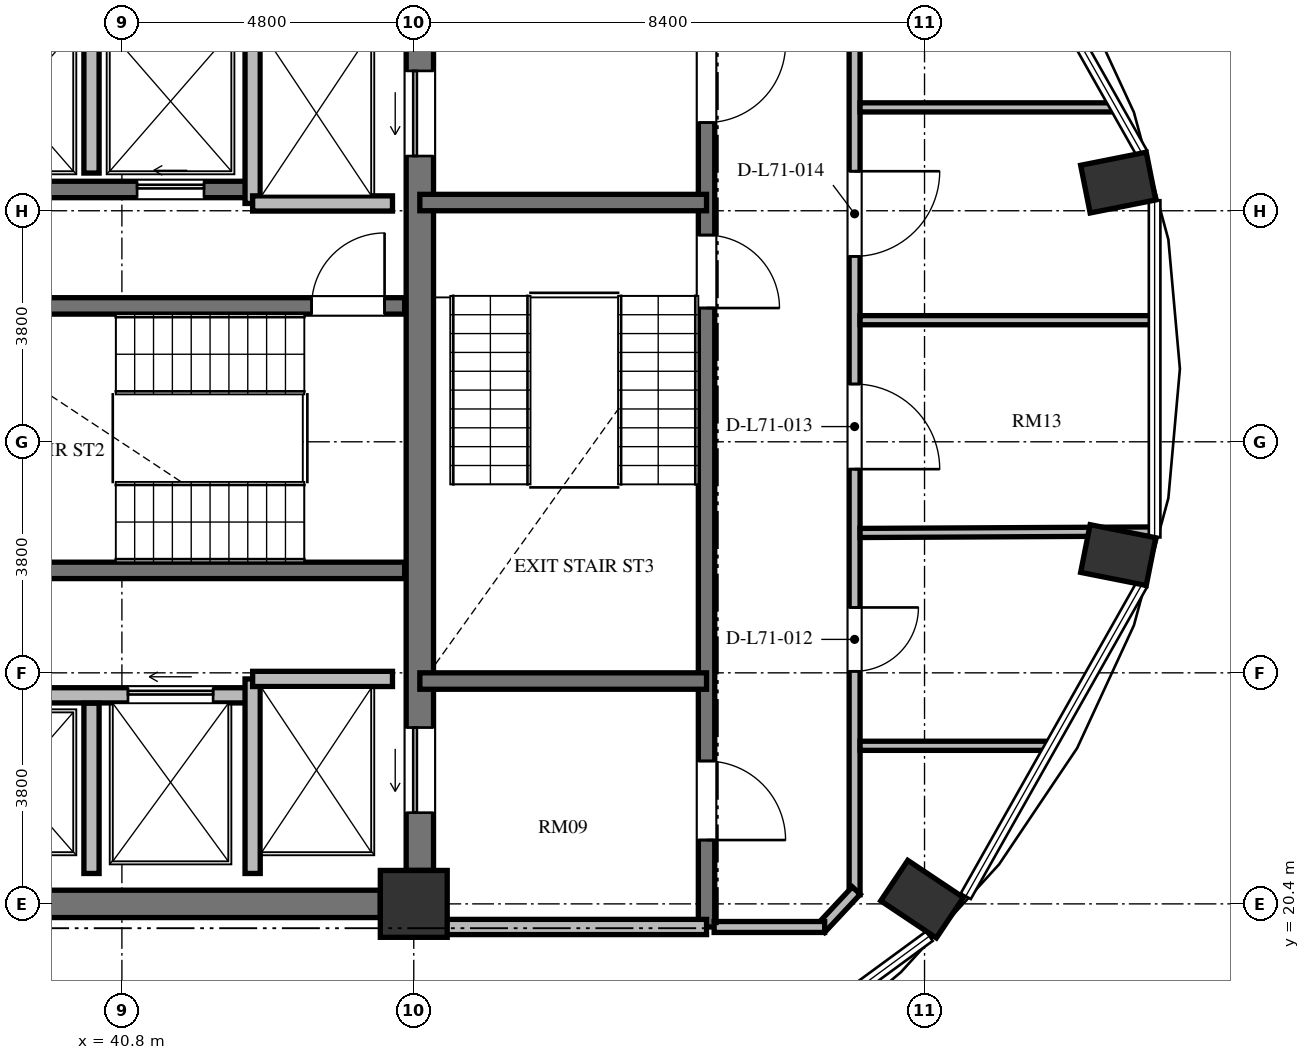
"""IFC4 building model, lengths in metres.
Left out: names, types, materials, properties, quantities, classifications, styles, units other than length and angle.
Written with IfcOpenShell. Run it as: python <this file> out.ifc"""

import sys

from ifc_helpers import new_model, si_unit, direction, frame, frame_2d, origin, origin_2d, place, context, subcontext, project, spatial, rectangle, extrude, element, fill, save


model = new_model("IFC4")
c1 = context("Model", 3, precision=1e-05, world=origin(), true_north=direction((0.0, 1.0)))
c2 = subcontext(c1, "Body", "Model", "MODEL_VIEW")
j1 = project(units=[si_unit("LENGTHUNIT", "METRE"), si_unit("PLANEANGLEUNIT", "RADIAN")], contexts=[c1])
p1 = place(None, origin())
s1 = spatial("IfcSite", under=j1, at=p1, CompositionType="ELEMENT")
p2 = place(p1, origin())
s2 = spatial("IfcBuilding", under=s1, at=p2, CompositionType="ELEMENT")
p3 = place(p2, frame((0.0, 0.0, 273.264)))
s3 = spatial("IfcBuildingStorey", under=s2, at=p3, CompositionType="ELEMENT", Elevation=273.264)
for number, where, z_axis, x_axis in (
    (1, (53.96, 20.478, 0.0), (0.0, 0.0, 1.0), (0.831, -0.556, 0.0)),
    (2, (57.185, 26.137, 0.0), (0.0, 0.0, 1.0), (0.981, -0.195, 0.0)),
    (3, (57.185, 32.263, 0.0), (0.0, 0.0, 1.0), (0.981, 0.195, 0.0)),
):
    element("IfcColumn", number, at=place(p3, frame(where, z_axis=z_axis, x_axis=x_axis)), inside=s3, PredefinedType="COLUMN", context=c2, shape_type="SweptSolid", body=[
        extrude(rectangle(XDim=1.1, YDim=0.8, at=origin_2d()), origin(), (0.0, 0.0, 1.0), 3.648),
    ])
p4 = place(p3, frame((45.6, 20.4, 0.0), z_axis=(0.0, 0.0, 1.0), x_axis=(1.0, 0.0, 0.0)))
e4 = element("IfcColumn", 4, at=p4, inside=s3, PredefinedType="COLUMN", context=c2, shape_type="SweptSolid", body=[
    extrude(rectangle(XDim=1.1, YDim=1.1, at=origin_2d()), origin(), (0.0, 0.0, 1.0), 3.648),
])
p5 = place(p3, frame((45.7, 20.95, 0.0), z_axis=(0.0, 0.0, 1.0), x_axis=(0.0, 1.0, 0.0)))
e5 = element("IfcWall", 5, at=p5, inside=s3, PredefinedType="SHEAR", context=c2, shape_type="SweptSolid", body=[
    extrude(rectangle(XDim=14.1, YDim=0.45, at=frame_2d((7.05, 0.0))), origin(), (0.0, 0.0, 1.0), 3.648),
])
p6 = place(p5, frame((11.75, 0.0, 0.0)))
e6 = element("IfcOpeningElement", 6, at=p6, cuts=e5, PredefinedType="OPENING", context=c2, shape_type="SweptSolid", body=[
    extrude(rectangle(XDim=1.4, YDim=2.3, at=frame_2d((0.7, 1.15))), frame((0.0, 0.235, 0.0), z_axis=(0.0, -1.0, 0.0), x_axis=(1.0, 0.0, 0.0)), (0.0, 0.0, 1.0), 0.47),
])
p7 = place(p5, frame((0.95, 0.0, 0.0)))
e7 = element("IfcOpeningElement", 7, at=p7, cuts=e5, PredefinedType="OPENING", context=c2, shape_type="SweptSolid", body=[
    extrude(rectangle(XDim=1.4, YDim=2.3, at=frame_2d((0.7, 1.15))), frame((0.0, 0.235, 0.0), z_axis=(0.0, -1.0, 0.0), x_axis=(1.0, 0.0, 0.0)), (0.0, 0.0, 1.0), 0.47),
])
p8 = place(p3, frame((39.6, 20.4, 0.0), z_axis=(0.0, 0.0, 1.0), x_axis=(1.0, 0.0, 0.0)))
e8 = element("IfcWall", 8, at=p8, inside=s3, PredefinedType="SHEAR", context=c2, shape_type="SweptSolid", body=[
    extrude(rectangle(XDim=5.45, YDim=0.45, at=frame_2d((2.725, 0.0))), origin(), (0.0, 0.0, 1.0), 3.648),
])
p9 = place(p3, frame((37.465, 30.235, 0.0), z_axis=(0.0, 0.0, 1.0), x_axis=(1.0, 0.0, 0.0)))
e9 = element("IfcWall", 9, at=p9, inside=s3, PredefinedType="SHEAR", context=c2, shape_type="SweptSolid", body=[
    extrude(rectangle(XDim=7.985, YDim=0.27, at=frame_2d((3.992, 0.0))), origin(), (0.0, 0.0, 1.0), 3.648),
])
p10 = place(p9, frame((6.455, 0.0, 0.0)))
e10 = element("IfcOpeningElement", 10, at=p10, cuts=e9, PredefinedType="OPENING", context=c2, shape_type="SweptSolid", body=[
    extrude(rectangle(XDim=1.2, YDim=2.15, at=frame_2d((0.6, 1.075))), frame((0.0, 0.145, 0.0), z_axis=(0.0, -1.0, 0.0), x_axis=(1.0, 0.0, 0.0)), (0.0, 0.0, 1.0), 0.29),
])
p11 = place(p3, frame((37.465, 25.885, 0.0), z_axis=(0.0, 0.0, 1.0), x_axis=(1.0, 0.0, 0.0)))
e11 = element("IfcWall", 11, at=p11, inside=s3, PredefinedType="SHEAR", context=c2, shape_type="SweptSolid", body=[
    extrude(rectangle(XDim=7.985, YDim=0.27, at=frame_2d((3.992, 0.0))), origin(), (0.0, 0.0, 1.0), 3.648),
])
p12 = place(p3, frame((26.55, 32.15, 0.0), z_axis=(0.0, 0.0, 1.0), x_axis=(1.0, 0.0, 0.0)))
e12 = element("IfcWall", 12, at=p12, inside=s3, PredefinedType="SHEAR", context=c2, shape_type="SweptSolid", body=[
    extrude(rectangle(XDim=16.4, YDim=0.27, at=frame_2d((8.2, 0.0))), origin(), (0.0, 0.0, 1.0), 3.648),
])
p13 = place(p12, frame((2.175, 0.0, 0.0)))
e13 = element("IfcOpeningElement", 13, at=p13, cuts=e12, PredefinedType="OPENING", context=c2, shape_type="SweptSolid", body=[
    extrude(rectangle(XDim=1.05, YDim=2.15, at=frame_2d((0.525, 1.075))), frame((0.0, 0.145, 0.0), z_axis=(0.0, -1.0, 0.0), x_axis=(1.0, 0.0, 0.0)), (0.0, 0.0, 1.0), 0.29),
])
p14 = place(p12, frame((7.575, 0.0, 0.0)))
e14 = element("IfcOpeningElement", 14, at=p14, cuts=e12, PredefinedType="OPENING", context=c2, shape_type="SweptSolid", body=[
    extrude(rectangle(XDim=1.05, YDim=2.15, at=frame_2d((0.525, 1.075))), frame((0.0, 0.145, 0.0), z_axis=(0.0, -1.0, 0.0), x_axis=(1.0, 0.0, 0.0)), (0.0, 0.0, 1.0), 0.29),
])
p15 = place(p12, frame((11.9, 0.0, 0.0)))
e15 = element("IfcOpeningElement", 15, at=p15, cuts=e12, PredefinedType="OPENING", context=c2, shape_type="SweptSolid", body=[
    extrude(rectangle(XDim=1.1, YDim=2.2, at=frame_2d((0.55, 1.1))), frame((0.0, 0.145, 0.0), z_axis=(0.0, -1.0, 0.0), x_axis=(1.0, 0.0, 0.0)), (0.0, 0.0, 1.0), 0.29),
])
p16 = place(p12, frame((14.5, 0.0, 0.0)))
e16 = element("IfcOpeningElement", 16, at=p16, cuts=e12, PredefinedType="OPENING", context=c2, shape_type="SweptSolid", body=[
    extrude(rectangle(XDim=1.1, YDim=2.2, at=frame_2d((0.55, 1.1))), frame((0.0, 0.145, 0.0), z_axis=(0.0, -1.0, 0.0), x_axis=(1.0, 0.0, 0.0)), (0.0, 0.0, 1.0), 0.29),
])
p17 = place(p3, frame((26.75, 23.83, 0.0), z_axis=(0.0, 0.0, 1.0), x_axis=(1.0, 0.0, 0.0)))
e17 = element("IfcWall", 17, at=p17, inside=s3, PredefinedType="SOLIDWALL", context=c2, shape_type="SweptSolid", body=[
    extrude(rectangle(XDim=16.2, YDim=0.25, at=frame_2d((8.1, 0.0))), origin(), (0.0, 0.0, 1.0), 3.448),
])
p18 = place(p17, frame((4.75, 0.0, 0.0)))
e18 = element("IfcOpeningElement", 18, at=p18, cuts=e17, PredefinedType="OPENING", context=c2, shape_type="SweptSolid", body=[
    extrude(rectangle(XDim=1.4, YDim=2.2, at=frame_2d((0.7, 1.1))), frame((0.0, 0.135, 0.0), z_axis=(0.0, -1.0, 0.0), x_axis=(1.0, 0.0, 0.0)), (0.0, 0.0, 1.0), 0.27),
])
p19 = place(p17, frame((11.7, 0.0, 0.0)))
e19 = element("IfcOpeningElement", 19, at=p19, cuts=e17, PredefinedType="OPENING", context=c2, shape_type="SweptSolid", body=[
    extrude(rectangle(XDim=1.1, YDim=2.2, at=frame_2d((0.55, 1.1))), frame((0.0, 0.135, 0.0), z_axis=(0.0, -1.0, 0.0), x_axis=(1.0, 0.0, 0.0)), (0.0, 0.0, 1.0), 0.27),
])
p20 = place(p17, frame((14.15, 0.0, 0.0)))
e20 = element("IfcOpeningElement", 20, at=p20, cuts=e17, PredefinedType="OPENING", context=c2, shape_type="SweptSolid", body=[
    extrude(rectangle(XDim=1.4, YDim=2.3, at=frame_2d((0.7, 1.15))), frame((0.0, 0.135, 0.0), z_axis=(0.0, -1.0, 0.0), x_axis=(1.0, 0.0, 0.0)), (0.0, 0.0, 1.0), 0.27),
])
p21 = place(p3, frame((42.95, 31.92, 0.0), z_axis=(0.0, 0.0, 1.0), x_axis=(0.0, 1.0, 0.0)))
e21 = element("IfcWall", 21, at=p21, inside=s3, PredefinedType="SOLIDWALL", context=c2, shape_type="SweptSolid", body=[
    extrude(rectangle(XDim=3.18, YDim=0.25, at=frame_2d((1.59, 0.0))), origin(), (0.0, 0.0, 1.0), 3.448),
])
p22 = place(p3, frame((42.95, 31.92, 0.0), z_axis=(0.0, 0.0, 1.0), x_axis=(1.0, 0.0, 0.0)))
e22 = element("IfcWall", 22, at=p22, inside=s3, PredefinedType="SOLIDWALL", context=c2, shape_type="SweptSolid", body=[
    extrude(rectangle(XDim=2.3, YDim=0.25, at=frame_2d((1.15, 0.0))), origin(), (0.0, 0.0, 1.0), 3.448),
])
p23 = place(p3, frame((42.95, 20.9, 0.0), z_axis=(0.0, 0.0, 1.0), x_axis=(0.0, 1.0, 0.0)))
e23 = element("IfcWall", 23, at=p23, inside=s3, PredefinedType="SOLIDWALL", context=c2, shape_type="SweptSolid", body=[
    extrude(rectangle(XDim=3.2, YDim=0.25, at=frame_2d((1.6, 0.0))), origin(), (0.0, 0.0, 1.0), 3.448),
])
p24 = place(p3, frame((42.95, 24.1, 0.0), z_axis=(0.0, 0.0, 1.0), x_axis=(1.0, 0.0, 0.0)))
e24 = element("IfcWall", 24, at=p24, inside=s3, PredefinedType="SOLIDWALL", context=c2, shape_type="SweptSolid", body=[
    extrude(rectangle(XDim=2.3, YDim=0.25, at=frame_2d((1.15, 0.0))), origin(), (0.0, 0.0, 1.0), 3.448),
])
p25 = place(p3, frame((40.3, 32.42, 0.0), z_axis=(0.0, 0.0, 1.0), x_axis=(0.0, 1.0, 0.0)))
e25 = element("IfcWall", 25, at=p25, inside=s3, PredefinedType="SOLIDWALL", context=c2, shape_type="SweptSolid", body=[
    extrude(rectangle(XDim=2.68, YDim=0.25, at=frame_2d((1.34, 0.0))), origin(), (0.0, 0.0, 1.0), 3.448),
])
p26 = place(p3, frame((40.3, 20.9, 0.0), z_axis=(0.0, 0.0, 1.0), x_axis=(0.0, 1.0, 0.0)))
e26 = element("IfcWall", 26, at=p26, inside=s3, PredefinedType="SOLIDWALL", context=c2, shape_type="SweptSolid", body=[
    extrude(rectangle(XDim=2.8, YDim=0.25, at=frame_2d((1.4, 0.0))), origin(), (0.0, 0.0, 1.0), 3.448),
])
p27 = place(p3, frame((50.415, 35.845, 0.0), z_axis=(0.0, 0.0, 1.0), x_axis=(0.0, -1.0, 0.0)))
e27 = element("IfcWall", 27, at=p27, inside=s3, PredefinedType="SHEAR", context=c2, shape_type="SweptSolid", body=[
    extrude(rectangle(XDim=15.825, YDim=0.27, at=frame_2d((7.913, 0.0))), origin(), (0.0, 0.0, 1.0), 3.648),
])
p28 = place(p27, frame((4.445, 0.0, 0.0)))
e28 = element("IfcOpeningElement", 28, at=p28, cuts=e27, PredefinedType="OPENING", context=c2, shape_type="SweptSolid", body=[
    extrude(rectangle(XDim=1.2, YDim=2.15, at=frame_2d((0.6, 1.075))), frame((0.0, 0.145, 0.0), z_axis=(0.0, -1.0, 0.0), x_axis=(1.0, 0.0, 0.0)), (0.0, 0.0, 1.0), 0.29),
])
p29 = place(p27, frame((1.295, 0.0, 0.0)))
e29 = element("IfcOpeningElement", 29, at=p29, cuts=e27, PredefinedType="OPENING", context=c2, shape_type="SweptSolid", body=[
    extrude(rectangle(XDim=1.3, YDim=2.2, at=frame_2d((0.65, 1.1))), frame((0.0, 0.145, 0.0), z_axis=(0.0, -1.0, 0.0), x_axis=(1.0, 0.0, 0.0)), (0.0, 0.0, 1.0), 0.29),
])
p30 = place(p27, frame((13.095, 0.0, 0.0)))
e30 = element("IfcOpeningElement", 30, at=p30, cuts=e27, PredefinedType="OPENING", context=c2, shape_type="SweptSolid", body=[
    extrude(rectangle(XDim=1.3, YDim=2.2, at=frame_2d((0.65, 1.1))), frame((0.0, 0.145, 0.0), z_axis=(0.0, -1.0, 0.0), x_axis=(1.0, 0.0, 0.0)), (0.0, 0.0, 1.0), 0.29),
])
for number, where, z_axis, x_axis in (
    (31, (45.7, 31.935, 0.0), (0.0, 0.0, 1.0), (1.0, 0.0, 0.0)),
    (32, (45.7, 24.065, 0.0), (0.0, 0.0, 1.0), (1.0, 0.0, 0.0)),
):
    element("IfcWall", number, at=place(p3, frame(where, z_axis=z_axis, x_axis=x_axis)), inside=s3, PredefinedType="SHEAR", context=c2, shape_type="SweptSolid", body=[
        extrude(rectangle(XDim=4.715, YDim=0.27, at=frame_2d((2.357, 0.0))), origin(), (0.0, 0.0, 1.0), 3.648),
    ])
p31 = place(p3, frame((45.7, 20.02, 0.0), z_axis=(0.0, 0.0, 1.0), x_axis=(1.0, 0.0, 0.0)))
e33 = element("IfcWall", 33, at=p31, inside=s3, PredefinedType="SOLIDWALL", context=c2, shape_type="SweptSolid", body=[
    extrude(rectangle(XDim=4.715, YDim=0.25, at=frame_2d((2.357, 0.0))), origin(), (0.0, 0.0, 1.0), 3.448),
])
p32 = place(p3, frame((52.85, 37.85, 0.0), z_axis=(0.0, 0.0, 1.0), x_axis=(0.0, -1.0, 0.0)))
e34 = element("IfcWall", 34, at=p32, inside=s3, PredefinedType="PARTITIONING", context=c2, shape_type="SweptSolid", body=[
    extrude(rectangle(XDim=17.3, YDim=0.18, at=frame_2d((8.65, 0.0))), origin(), (0.0, 0.0, 1.0), 3.448),
])
p33 = place(p32, frame((12.575, 0.0, 0.0)))
e35 = element("IfcOpeningElement", 35, at=p33, cuts=e34, PredefinedType="OPENING", context=c2, shape_type="SweptSolid", body=[
    extrude(rectangle(XDim=1.05, YDim=2.15, at=frame_2d((0.525, 1.075))), frame((0.0, 0.1, 0.0), z_axis=(0.0, -1.0, 0.0), x_axis=(1.0, 0.0, 0.0)), (0.0, 0.0, 1.0), 0.2),
])
p34 = place(p32, frame((8.9, 0.0, 0.0)))
e36 = element("IfcOpeningElement", 36, at=p34, cuts=e34, PredefinedType="OPENING", context=c2, shape_type="SweptSolid", body=[
    extrude(rectangle(XDim=1.4, YDim=2.2, at=frame_2d((0.7, 1.1))), frame((0.0, 0.1, 0.0), z_axis=(0.0, -1.0, 0.0), x_axis=(1.0, 0.0, 0.0)), (0.0, 0.0, 1.0), 0.2),
])
p35 = place(p32, frame((5.4, 0.0, 0.0)))
e37 = element("IfcOpeningElement", 37, at=p35, cuts=e34, PredefinedType="OPENING", context=c2, shape_type="SweptSolid", body=[
    extrude(rectangle(XDim=1.4, YDim=2.2, at=frame_2d((0.7, 1.1))), frame((0.0, 0.1, 0.0), z_axis=(0.0, -1.0, 0.0), x_axis=(1.0, 0.0, 0.0)), (0.0, 0.0, 1.0), 0.2),
])
p36 = place(p3, frame((52.877, 20.619, 0.0), z_axis=(0.0, 0.0, 1.0), x_axis=(-0.682409308253, -0.730970270264, 0.0)))
e38 = element("IfcWall", 38, at=p36, inside=s3, PredefinedType="PARTITIONING", context=c2, shape_type="SweptSolid", body=[
    extrude(rectangle(XDim=0.86, YDim=0.18, at=frame_2d((0.43, 0.0))), origin(), (0.0, 0.0, 1.0), 3.448),
])
p37 = place(p3, frame((52.358, 20.02, 0.0), z_axis=(0.0, 0.0, 1.0), x_axis=(-1.0, 0.0, 0.0)))
e39 = element("IfcWall", 39, at=p37, inside=s3, PredefinedType="PARTITIONING", context=c2, shape_type="SweptSolid", body=[
    extrude(rectangle(XDim=1.818, YDim=0.18, at=frame_2d((0.909, 0.0))), origin(), (0.0, 0.0, 1.0), 3.448),
])
p38 = place(p3, frame((52.94, 23.0, 0.0), z_axis=(0.0, 0.0, 1.0), x_axis=(1.0, 0.0, 0.0)))
e40 = element("IfcWall", 40, at=p38, inside=s3, PredefinedType="PARTITIONING", context=c2, shape_type="SweptSolid", body=[
    extrude(rectangle(XDim=3.126, YDim=0.15, at=frame_2d((1.563, 0.0))), origin(), (0.0, 0.0, 1.0), 3.448),
])
p39 = place(p3, frame((52.94, 26.5, 0.0), z_axis=(0.0, 0.0, 1.0), x_axis=(0.999987566883, 0.004986589892, 0.0)))
e41 = element("IfcWall", 41, at=p39, inside=s3, PredefinedType="PARTITIONING", context=c2, shape_type="SweptSolid", body=[
    extrude(rectangle(XDim=4.847, YDim=0.15, at=frame_2d((2.423, 0.0))), origin(), (0.0, 0.0, 1.0), 3.448),
])
p40 = place(p3, frame((52.94, 30.0, 0.0), z_axis=(0.0, 0.0, 1.0), x_axis=(1.0, 0.0, 0.0)))
e42 = element("IfcWall", 42, at=p40, inside=s3, PredefinedType="PARTITIONING", context=c2, shape_type="SweptSolid", body=[
    extrude(rectangle(XDim=4.832, YDim=0.15, at=frame_2d((2.416, 0.0))), origin(), (0.0, 0.0, 1.0), 3.448),
])
p41 = place(p3, frame((52.94, 33.5, 0.0), z_axis=(0.0, 0.0, 1.0), x_axis=(1.0, 0.0, 0.0)))
e43 = element("IfcWall", 43, at=p41, inside=s3, PredefinedType="PARTITIONING", context=c2, shape_type="SweptSolid", body=[
    extrude(rectangle(XDim=4.199, YDim=0.15, at=frame_2d((2.1, 0.0))), origin(), (0.0, 0.0, 1.0), 3.448),
])
p42 = place(p10, origin())
e44 = element("IfcDoor", 44, at=p42, inside=s3, OperationType="SINGLE_SWING_RIGHT", PredefinedType="DOOR", context=c2, shape_type="SweptSolid", body=[
    extrude(rectangle(XDim=1.2, YDim=2.15, at=frame_2d((0.6, 1.075))), frame((0.0, 0.025, 0.0), z_axis=(0.0, -1.0, 0.0), x_axis=(1.0, 0.0, 0.0)), (0.0, 0.0, 1.0), 0.05),
])
fill(e10, e44)
p43 = place(p16, origin())
e45 = element("IfcDoor", 45, at=p43, inside=s3, OperationType="SLIDING_TO_LEFT", PredefinedType="DOOR", context=c2, shape_type="SweptSolid", body=[
    extrude(rectangle(XDim=1.1, YDim=2.2, at=frame_2d((0.55, 1.1))), frame((0.0, 0.025, 0.0), z_axis=(0.0, -1.0, 0.0), x_axis=(1.0, 0.0, 0.0)), (0.0, 0.0, 1.0), 0.05),
])
fill(e16, e45)
p44 = place(p6, origin())
e46 = element("IfcDoor", 46, at=p44, inside=s3, OperationType="SLIDING_TO_LEFT", PredefinedType="DOOR", context=c2, shape_type="SweptSolid", body=[
    extrude(rectangle(XDim=1.4, YDim=2.3, at=frame_2d((0.7, 1.15))), frame((0.0, 0.025, 0.0), z_axis=(0.0, -1.0, 0.0), x_axis=(1.0, 0.0, 0.0)), (0.0, 0.0, 1.0), 0.05),
])
fill(e6, e46)
p45 = place(p7, origin())
e47 = element("IfcDoor", 47, at=p45, inside=s3, OperationType="SLIDING_TO_LEFT", PredefinedType="DOOR", context=c2, shape_type="SweptSolid", body=[
    extrude(rectangle(XDim=1.4, YDim=2.3, at=frame_2d((0.7, 1.15))), frame((0.0, 0.025, 0.0), z_axis=(0.0, -1.0, 0.0), x_axis=(1.0, 0.0, 0.0)), (0.0, 0.0, 1.0), 0.05),
])
fill(e7, e47)
p46 = place(p20, origin())
e48 = element("IfcDoor", 48, at=p46, inside=s3, OperationType="SLIDING_TO_LEFT", PredefinedType="DOOR", context=c2, shape_type="SweptSolid", body=[
    extrude(rectangle(XDim=1.4, YDim=2.3, at=frame_2d((0.7, 1.15))), frame((0.0, 0.025, 0.0), z_axis=(0.0, -1.0, 0.0), x_axis=(1.0, 0.0, 0.0)), (0.0, 0.0, 1.0), 0.05),
])
fill(e20, e48)
p47 = place(p28, origin())
e49 = element("IfcDoor", 49, at=p47, inside=s3, OperationType="SINGLE_SWING_RIGHT", PredefinedType="DOOR", context=c2, shape_type="SweptSolid", body=[
    extrude(rectangle(XDim=1.2, YDim=2.15, at=frame_2d((0.6, 1.075))), frame((0.0, 0.025, 0.0), z_axis=(0.0, -1.0, 0.0), x_axis=(1.0, 0.0, 0.0)), (0.0, 0.0, 1.0), 0.05),
])
fill(e28, e49)
p48 = place(p29, origin())
e50 = element("IfcDoor", 50, at=p48, inside=s3, OperationType="SINGLE_SWING_LEFT", PredefinedType="DOOR", context=c2, shape_type="SweptSolid", body=[
    extrude(rectangle(XDim=1.3, YDim=2.2, at=frame_2d((0.65, 1.1))), frame((0.0, 0.025, 0.0), z_axis=(0.0, -1.0, 0.0), x_axis=(1.0, 0.0, 0.0)), (0.0, 0.0, 1.0), 0.05),
])
fill(e29, e50)
p49 = place(p30, origin())
e51 = element("IfcDoor", 51, at=p49, inside=s3, OperationType="SINGLE_SWING_RIGHT", PredefinedType="DOOR", context=c2, shape_type="SweptSolid", body=[
    extrude(rectangle(XDim=1.3, YDim=2.2, at=frame_2d((0.65, 1.1))), frame((0.0, 0.025, 0.0), z_axis=(0.0, -1.0, 0.0), x_axis=(1.0, 0.0, 0.0)), (0.0, 0.0, 1.0), 0.05),
])
fill(e30, e51)
p50 = place(p33, origin())
e52 = element("IfcDoor", 52, at=p50, inside=s3, OperationType="SINGLE_SWING_LEFT", PredefinedType="DOOR", context=c2, shape_type="SweptSolid", body=[
    extrude(rectangle(XDim=1.05, YDim=2.15, at=frame_2d((0.525, 1.075))), frame((0.0, 0.025, 0.0), z_axis=(0.0, -1.0, 0.0), x_axis=(1.0, 0.0, 0.0)), (0.0, 0.0, 1.0), 0.05),
])
fill(e35, e52)
p51 = place(p34, origin())
e53 = element("IfcDoor", 53, at=p51, inside=s3, OperationType="SINGLE_SWING_RIGHT", PredefinedType="DOOR", context=c2, shape_type="SweptSolid", body=[
    extrude(rectangle(XDim=1.4, YDim=2.2, at=frame_2d((0.7, 1.1))), frame((0.0, 0.025, 0.0), z_axis=(0.0, -1.0, 0.0), x_axis=(1.0, 0.0, 0.0)), (0.0, 0.0, 1.0), 0.05),
])
fill(e36, e53)
p52 = place(p35, origin())
e54 = element("IfcDoor", 54, at=p52, inside=s3, OperationType="SINGLE_SWING_LEFT", PredefinedType="DOOR", context=c2, shape_type="SweptSolid", body=[
    extrude(rectangle(XDim=1.4, YDim=2.2, at=frame_2d((0.7, 1.1))), frame((0.0, 0.025, 0.0), z_axis=(0.0, -1.0, 0.0), x_axis=(1.0, 0.0, 0.0)), (0.0, 0.0, 1.0), 0.05),
])
fill(e37, e54)
save(model, sys.argv[1])
